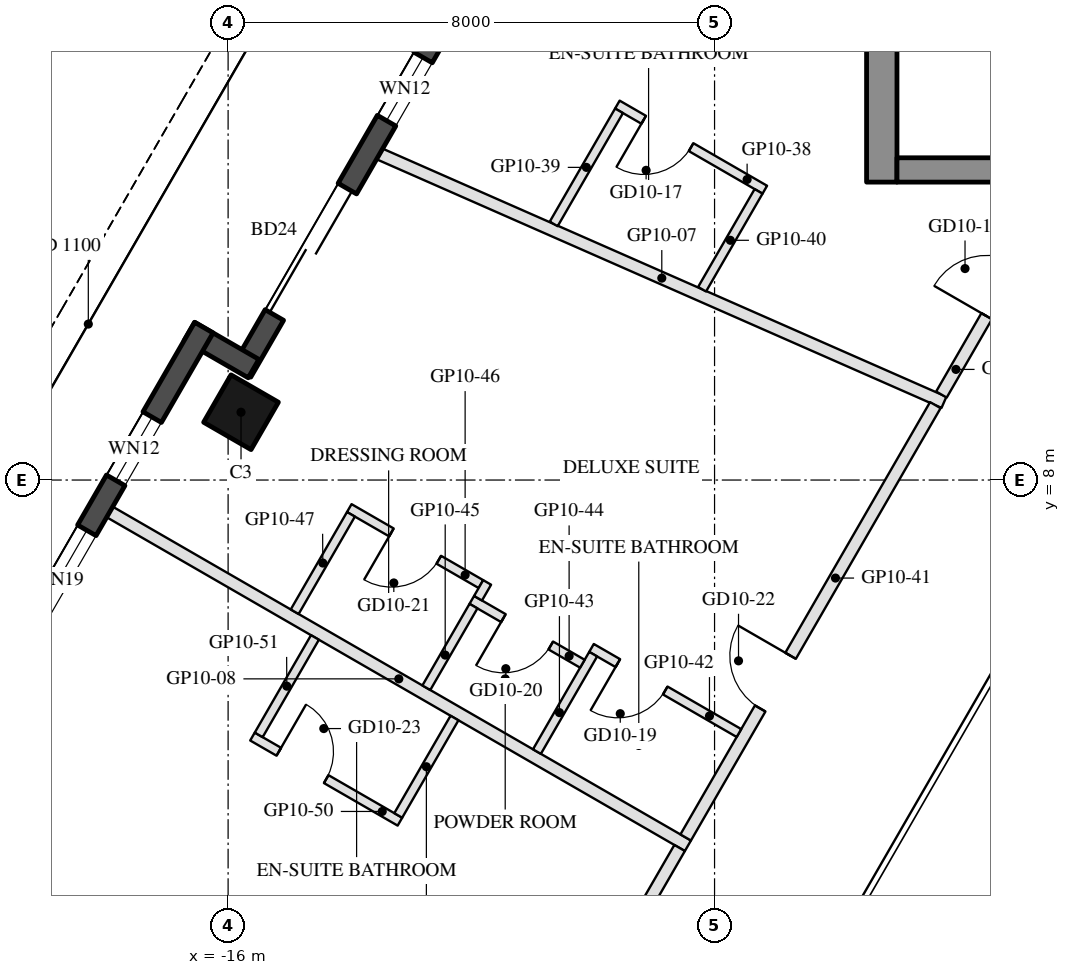
"""IFC4 building model, lengths in metres.
Left out: names, types, materials, properties, quantities, classifications, styles, units other than length and angle.
Written with IfcOpenShell. Run it as: python <this file> out.ifc"""

import sys

from ifc_helpers import new_model, si_unit, direction, frame, frame_2d, origin, origin_2d, place, context, subcontext, project, spatial, rectangle, hollow_rectangle, extrude, element, fill, save


model = new_model("IFC4")
c1 = context("Model", 3, precision=1e-05, world=origin(), true_north=direction((0.0, 1.0)))
c2 = subcontext(c1, "Body", "Model", "MODEL_VIEW")
j1 = project(units=[si_unit("LENGTHUNIT", "METRE"), si_unit("PLANEANGLEUNIT", "RADIAN")], contexts=[c1])
p1 = place(None, origin())
s1 = spatial("IfcSite", under=j1, at=p1, CompositionType="ELEMENT")
p2 = place(p1, origin())
s2 = spatial("IfcBuilding", under=s1, at=p2, CompositionType="ELEMENT")
p3 = place(p2, frame((0.0, 0.0, 116.8)))
s3 = spatial("IfcBuildingStorey", under=s2, at=p3, CompositionType="ELEMENT", Elevation=116.8)
p4 = place(p3, frame((-15.788, 9.115, 0.0), z_axis=(0.0, 0.0, 1.0), x_axis=(0.5, 0.866025403784, 0.0)))
e1 = element("IfcColumn", 1, at=p4, inside=s3, PredefinedType="COLUMN", context=c2, shape_type="SweptSolid", body=[
    extrude(hollow_rectangle(XDim=0.9, YDim=0.9, WallThickness=0.04, at=origin_2d()), origin(), (0.0, 0.0, 1.0), 3.7),
])
p5 = place(p3, frame((-12.409, 15.617, 0.0), z_axis=(0.0, 0.0, 1.0), x_axis=(-0.500003597184, -0.866023326939, 0.0)))
e2 = element("IfcWall", 2, at=p5, inside=s3, PredefinedType="SOLIDWALL", context=c2, shape_type="SweptSolid", body=[
    extrude(rectangle(XDim=6.74, YDim=0.35, at=frame_2d((3.37, 0.0))), origin(), (0.0, 0.0, 1.0), 3.55),
])
p6 = place(p5, frame((0.77, 0.0, 0.3)))
e3 = element("IfcOpeningElement", 3, at=p6, cuts=e2, PredefinedType="OPENING", context=c2, shape_type="SweptSolid", body=[
    extrude(rectangle(XDim=1.2, YDim=2.65, at=frame_2d((0.6, 1.325))), frame((0.0, 0.185, 0.0), z_axis=(0.0, -1.0, 0.0), x_axis=(1.0, 0.0, 0.0)), (0.0, 0.0, 1.0), 0.37),
])
p7 = place(p5, frame((3.26, 0.0, 0.0)))
e4 = element("IfcOpeningElement", 4, at=p7, cuts=e2, PredefinedType="OPENING", context=c2, shape_type="SweptSolid", body=[
    extrude(rectangle(XDim=2.4, YDim=2.4, at=frame_2d((1.2, 1.2))), frame((0.0, 0.185, 0.0), z_axis=(0.0, -1.0, 0.0), x_axis=(1.0, 0.0, 0.0)), (0.0, 0.0, 1.0), 0.37),
])
p8 = place(p3, frame((-15.581, 9.833, 0.0), z_axis=(0.0, 0.0, 1.0), x_axis=(-0.866055662726, 0.499947586314, 0.0)))
e5 = element("IfcWall", 5, at=p8, inside=s3, PredefinedType="SOLIDWALL", context=c2, shape_type="SweptSolid", body=[
    extrude(rectangle(XDim=1.22, YDim=0.35, at=frame_2d((0.61, 0.0))), origin(), (0.0, 0.0, 1.0), 3.55),
])
p9 = place(p3, frame((-16.398, 10.507, 0.0), z_axis=(0.0, 0.0, 1.0), x_axis=(-0.499999142773, -0.866025898704, 0.0)))
e6 = element("IfcWall", 6, at=p9, inside=s3, PredefinedType="SOLIDWALL", context=c2, shape_type="SweptSolid", body=[
    extrude(rectangle(XDim=9.7, YDim=0.35, at=frame_2d((4.85, 0.0))), origin(), (0.0, 0.0, 1.0), 3.55),
])
p10 = place(p9, frame((1.7, 0.0, 0.3)))
e7 = element("IfcOpeningElement", 7, at=p10, cuts=e6, PredefinedType="OPENING", context=c2, shape_type="SweptSolid", body=[
    extrude(rectangle(XDim=1.2, YDim=2.65, at=frame_2d((0.6, 1.325))), frame((0.0, 0.185, 0.0), z_axis=(0.0, -1.0, 0.0), x_axis=(1.0, 0.0, 0.0)), (0.0, 0.0, 1.0), 0.37),
])
p11 = place(p9, frame((3.85, 0.0, 0.3)))
e8 = element("IfcOpeningElement", 8, at=p11, cuts=e6, PredefinedType="OPENING", context=c2, shape_type="SweptSolid", body=[
    extrude(rectangle(XDim=1.9, YDim=2.65, at=frame_2d((0.95, 1.325))), frame((0.0, 0.185, 0.0), z_axis=(0.0, -1.0, 0.0), x_axis=(1.0, 0.0, 0.0)), (0.0, 0.0, 1.0), 0.37),
])
p12 = place(p9, frame((6.05, 0.0, 0.3)))
e9 = element("IfcOpeningElement", 9, at=p12, cuts=e6, PredefinedType="OPENING", context=c2, shape_type="SweptSolid", body=[
    extrude(rectangle(XDim=1.9, YDim=2.65, at=frame_2d((0.95, 1.325))), frame((0.0, 0.185, 0.0), z_axis=(0.0, -1.0, 0.0), x_axis=(1.0, 0.0, 0.0)), (0.0, 0.0, 1.0), 0.37),
])
p13 = place(p3, frame((-5.25, 12.9, 0.0), z_axis=(0.0, 0.0, 1.0), x_axis=(0.0, 1.0, 0.0)))
e10 = element("IfcWall", 10, at=p13, inside=s3, PredefinedType="SHEAR", context=c2, shape_type="SweptSolid", body=[
    extrude(rectangle(XDim=14.837, YDim=0.5, at=frame_2d((7.418, 0.0))), origin(), (0.0, 0.0, 1.0), 3.5),
])
p14 = place(p3, frame((5.0, 13.1, 0.0), z_axis=(0.0, 0.0, 1.0), x_axis=(-1.0, 0.0, 0.0)))
e11 = element("IfcWall", 11, at=p14, inside=s3, PredefinedType="SHEAR", context=c2, shape_type="SweptSolid", body=[
    extrude(rectangle(XDim=10.0, YDim=0.4, at=frame_2d((5.0, 0.0))), origin(), (0.0, 0.0, 1.0), 3.5),
])
p15 = place(p14, frame((3.55, 0.0, 0.0)))
e12 = element("IfcOpeningElement", 12, at=p15, cuts=e11, PredefinedType="OPENING", context=c2, shape_type="SweptSolid", body=[
    extrude(rectangle(XDim=1.1, YDim=2.1, at=frame_2d((0.55, 1.05))), frame((0.0, 0.21, 0.0), z_axis=(0.0, -1.0, 0.0), x_axis=(1.0, 0.0, 0.0)), (0.0, 0.0, 1.0), 0.42),
])
p16 = place(p14, frame((5.85, 0.0, 0.0)))
e13 = element("IfcOpeningElement", 13, at=p16, cuts=e11, PredefinedType="OPENING", context=c2, shape_type="SweptSolid", body=[
    extrude(rectangle(XDim=1.4, YDim=2.1, at=frame_2d((0.7, 1.05))), frame((0.0, 0.21, 0.0), z_axis=(0.0, -1.0, 0.0), x_axis=(1.0, 0.0, 0.0)), (0.0, 0.0, 1.0), 0.42),
])
p17 = place(p3, frame((-13.508, 13.363, 0.0), z_axis=(0.0, 0.0, 1.0), x_axis=(0.915297635711, -0.402778149932, 0.0)))
e14 = element("IfcWall", 14, at=p17, inside=s3, PredefinedType="PARTITIONING", context=c2, shape_type="SweptSolid", body=[
    extrude(rectangle(XDim=10.14, YDim=0.2, at=frame_2d((5.07, 0.0))), origin(), (0.0, 0.0, 1.0), 2.96),
])
p18 = place(p3, frame((-17.947, 7.475, 0.0), z_axis=(0.0, 0.0, 1.0), x_axis=(0.866027479907, -0.499996404033, 0.0)))
e15 = element("IfcWall", 15, at=p18, inside=s3, PredefinedType="PARTITIONING", context=c2, shape_type="SweptSolid", body=[
    extrude(rectangle(XDim=10.98, YDim=0.2, at=frame_2d((5.49, 0.0))), origin(), (0.0, 0.0, 1.0), 2.96),
])
p19 = place(p3, frame((-4.269, 9.406, 0.0), z_axis=(0.0, 0.0, 1.0), x_axis=(0.499968678846, 0.866043486306, 0.0)))
e16 = element("IfcWall", 16, at=p19, inside=s3, PredefinedType="PARTITIONING", context=c2, shape_type="SweptSolid", body=[
    extrude(rectangle(XDim=3.977, YDim=0.2, at=frame_2d((1.988, 0.0))), origin(), (0.0, 0.0, 1.0), 2.95),
])
p20 = place(p19, frame((1.488, 0.0, 0.0)))
e17 = element("IfcOpeningElement", 17, at=p20, cuts=e16, PredefinedType="OPENING", context=c2, shape_type="SweptSolid", body=[
    extrude(rectangle(XDim=1.0, YDim=2.1, at=frame_2d((0.5, 1.05))), frame((0.0, 0.11, 0.0), z_axis=(0.0, -1.0, 0.0), x_axis=(1.0, 0.0, 0.0)), (0.0, 0.0, 1.0), 0.22),
])
p21 = place(p3, frame((-7.174, 12.775, 0.0), z_axis=(0.0, 0.0, 1.0), x_axis=(-0.866034573852, 0.49998411664, 0.0)))
e18 = element("IfcWall", 18, at=p21, inside=s3, PredefinedType="PARTITIONING", context=c2, shape_type="SweptSolid", body=[
    extrude(rectangle(XDim=2.8, YDim=0.15, at=frame_2d((1.4, 0.0))), origin(), (0.0, 0.0, 1.0), 3.55),
])
p22 = place(p21, frame((1.4, 0.0, 0.0)))
e19 = element("IfcOpeningElement", 19, at=p22, cuts=e18, PredefinedType="OPENING", context=c2, shape_type="SweptSolid", body=[
    extrude(rectangle(XDim=0.9, YDim=2.1, at=frame_2d((0.45, 1.05))), frame((0.0, 0.085, 0.0), z_axis=(0.0, -1.0, 0.0), x_axis=(1.0, 0.0, 0.0)), (0.0, 0.0, 1.0), 0.17),
])
p23 = place(p3, frame((-9.571, 14.073, 0.0), z_axis=(0.0, 0.0, 1.0), x_axis=(-0.50005036918, -0.865996321171, 0.0)))
e20 = element("IfcWall", 20, at=p23, inside=s3, PredefinedType="PARTITIONING", context=c2, shape_type="SweptSolid", body=[
    extrude(rectangle(XDim=2.148, YDim=0.15, at=frame_2d((1.074, 0.0))), origin(), (0.0, 0.0, 1.0), 3.55),
])
p24 = place(p3, frame((-7.276, 12.748, 0.0), z_axis=(0.0, 0.0, 1.0), x_axis=(-0.500067438192, -0.865986464825, 0.0)))
e21 = element("IfcWall", 21, at=p24, inside=s3, PredefinedType="PARTITIONING", context=c2, shape_type="SweptSolid", body=[
    extrude(rectangle(XDim=1.858, YDim=0.15, at=frame_2d((0.929, 0.0))), origin(), (0.0, 0.0, 1.0), 3.55),
])
p25 = place(p3, frame((-8.475, 2.122, 0.0), z_axis=(0.0, 0.0, 1.0), x_axis=(0.500005592383, 0.866022174996, 0.0)))
e22 = element("IfcWall", 22, at=p25, inside=s3, PredefinedType="PARTITIONING", context=c2, shape_type="SweptSolid", body=[
    extrude(rectangle(XDim=8.21, YDim=0.2, at=frame_2d((4.105, 0.0))), origin(), (0.0, 0.0, 1.0), 2.95),
])
p26 = place(p25, frame((2.45, 0.0, 0.0)))
e23 = element("IfcOpeningElement", 23, at=p26, cuts=e22, PredefinedType="OPENING", context=c2, shape_type="SweptSolid", body=[
    extrude(rectangle(XDim=1.0, YDim=2.1, at=frame_2d((0.5, 1.05))), frame((0.0, 0.11, 0.0), z_axis=(0.0, -1.0, 0.0), x_axis=(1.0, 0.0, 0.0)), (0.0, 0.0, 1.0), 0.22),
])
p27 = place(p3, frame((-7.599, 3.839, 0.0), z_axis=(0.0, 0.0, 1.0), x_axis=(-0.866056369097, 0.49994636267, 0.0)))
e24 = element("IfcWall", 24, at=p27, inside=s3, PredefinedType="PARTITIONING", context=c2, shape_type="SweptSolid", body=[
    extrude(rectangle(XDim=2.8, YDim=0.15, at=frame_2d((1.4, 0.0))), origin(), (0.0, 0.0, 1.0), 3.55),
])
p28 = place(p27, frame((1.4, 0.0, 0.0)))
e25 = element("IfcOpeningElement", 25, at=p28, cuts=e24, PredefinedType="OPENING", context=c2, shape_type="SweptSolid", body=[
    extrude(rectangle(XDim=0.9, YDim=2.1, at=frame_2d((0.45, 1.05))), frame((0.0, 0.085, 0.0), z_axis=(0.0, -1.0, 0.0), x_axis=(1.0, 0.0, 0.0)), (0.0, 0.0, 1.0), 0.17),
])
p29 = place(p3, frame((-9.996, 5.136, 0.0), z_axis=(0.0, 0.0, 1.0), x_axis=(-0.499985172903, -0.866033964044, 0.0)))
e26 = element("IfcWall", 26, at=p29, inside=s3, PredefinedType="PARTITIONING", context=c2, shape_type="SweptSolid", body=[
    extrude(rectangle(XDim=1.85, YDim=0.15, at=frame_2d((0.925, 0.0))), origin(), (0.0, 0.0, 1.0), 3.55),
])
p30 = place(p3, frame((-10.174, 4.979, 0.0), z_axis=(0.0, 0.0, 1.0), x_axis=(-0.866009402589, 0.500027713859, 0.0)))
e27 = element("IfcWall", 27, at=p30, inside=s3, PredefinedType="PARTITIONING", context=c2, shape_type="SweptSolid", body=[
    extrude(rectangle(XDim=2.1, YDim=0.15, at=frame_2d((1.05, 0.0))), origin(), (0.0, 0.0, 1.0), 3.55),
])
p31 = place(p30, frame((0.6, 0.0, 0.0)))
e28 = element("IfcOpeningElement", 28, at=p31, cuts=e27, PredefinedType="OPENING", context=c2, shape_type="SweptSolid", body=[
    extrude(rectangle(XDim=0.9, YDim=2.1, at=frame_2d((0.45, 1.05))), frame((0.0, 0.085, 0.0), z_axis=(0.0, -1.0, 0.0), x_axis=(1.0, 0.0, 0.0)), (0.0, 0.0, 1.0), 0.17),
])
p32 = place(p3, frame((-11.965, 5.927, 0.0), z_axis=(0.0, 0.0, 1.0), x_axis=(-0.499899694197, -0.866083307622, 0.0)))
e29 = element("IfcWall", 29, at=p32, inside=s3, PredefinedType="PARTITIONING", context=c2, shape_type="SweptSolid", body=[
    extrude(rectangle(XDim=1.55, YDim=0.15, at=frame_2d((0.775, 0.0))), origin(), (0.0, 0.0, 1.0), 3.55),
])
p33 = place(p3, frame((-11.842, 6.289, 0.0), z_axis=(0.0, 0.0, 1.0), x_axis=(-0.866022959057, 0.500004234368, 0.0)))
e30 = element("IfcWall", 30, at=p33, inside=s3, PredefinedType="PARTITIONING", context=c2, shape_type="SweptSolid", body=[
    extrude(rectangle(XDim=2.5, YDim=0.15, at=frame_2d((1.25, 0.0))), origin(), (0.0, 0.0, 1.0), 3.55),
])
p34 = place(p33, frame((0.8, 0.0, 0.0)))
e31 = element("IfcOpeningElement", 31, at=p34, cuts=e30, PredefinedType="OPENING", context=c2, shape_type="SweptSolid", body=[
    extrude(rectangle(XDim=0.9, YDim=2.1, at=frame_2d((0.45, 1.05))), frame((0.0, 0.085, 0.0), z_axis=(0.0, -1.0, 0.0), x_axis=(1.0, 0.0, 0.0)), (0.0, 0.0, 1.0), 0.17),
])
p35 = place(p3, frame((-13.98, 7.436, 0.0), z_axis=(0.0, 0.0, 1.0), x_axis=(-0.499886193382, -0.866091100096, 0.0)))
e32 = element("IfcWall", 32, at=p35, inside=s3, PredefinedType="PARTITIONING", context=c2, shape_type="SweptSolid", body=[
    extrude(rectangle(XDim=1.85, YDim=0.15, at=frame_2d((0.925, 0.0))), origin(), (0.0, 0.0, 1.0), 3.55),
])
p36 = place(p3, frame((-11.74, 6.316, 0.0), z_axis=(0.0, 0.0, 1.0), x_axis=(-0.500426713919, -0.865778900179, 0.0)))
e33 = element("IfcWall", 33, at=p36, inside=s3, PredefinedType="PARTITIONING", context=c2, shape_type="SweptSolid", body=[
    extrude(rectangle(XDim=0.3, YDim=0.15, at=frame_2d((0.15, 0.0))), origin(), (0.0, 0.0, 1.0), 3.55),
])
p37 = place(p3, frame((-12.269, -4.45, 0.0), z_axis=(0.0, 0.0, 1.0), x_axis=(0.500009454961, 0.866019944892, 0.0)))
e34 = element("IfcWall", 34, at=p37, inside=s3, PredefinedType="PARTITIONING", context=c2, shape_type="SweptSolid", body=[
    extrude(rectangle(XDim=7.388, YDim=0.2, at=frame_2d((3.694, 0.0))), origin(), (0.0, 0.0, 1.0), 2.95),
])
p38 = place(p37, frame((3.194, 0.0, 0.0)))
e35 = element("IfcOpeningElement", 35, at=p38, cuts=e34, PredefinedType="OPENING", context=c2, shape_type="SweptSolid", body=[
    extrude(rectangle(XDim=1.0, YDim=2.1, at=frame_2d((0.5, 1.05))), frame((0.0, 0.11, 0.0), z_axis=(0.0, -1.0, 0.0), x_axis=(1.0, 0.0, 0.0)), (0.0, 0.0, 1.0), 0.22),
])
p39 = place(p3, frame((-15.599, 3.781, 0.0), z_axis=(0.0, 0.0, 1.0), x_axis=(0.866018616679, -0.500011755427, 0.0)))
e36 = element("IfcWall", 36, at=p39, inside=s3, PredefinedType="PARTITIONING", context=c2, shape_type="SweptSolid", body=[
    extrude(rectangle(XDim=2.8, YDim=0.15, at=frame_2d((1.4, 0.0))), origin(), (0.0, 0.0, 1.0), 3.55),
])
p40 = place(p39, frame((0.5, 0.0, 0.0)))
e37 = element("IfcOpeningElement", 37, at=p40, cuts=e36, PredefinedType="OPENING", context=c2, shape_type="SweptSolid", body=[
    extrude(rectangle(XDim=0.9, YDim=2.1, at=frame_2d((0.45, 1.05))), frame((0.0, 0.085, 0.0), z_axis=(0.0, -1.0, 0.0), x_axis=(1.0, 0.0, 0.0)), (0.0, 0.0, 1.0), 0.17),
])
p41 = place(p3, frame((-14.572, 5.411, 0.0), z_axis=(0.0, 0.0, 1.0), x_axis=(-0.499985172903, -0.866033964044, 0.0)))
e38 = element("IfcWall", 38, at=p41, inside=s3, PredefinedType="PARTITIONING", context=c2, shape_type="SweptSolid", body=[
    extrude(rectangle(XDim=1.85, YDim=0.15, at=frame_2d((0.925, 0.0))), origin(), (0.0, 0.0, 1.0), 2.95),
])
p42 = place(p3, frame((-12.277, 4.086, 0.0), z_axis=(0.0, 0.0, 1.0), x_axis=(-0.500042316284, -0.866000971088, 0.0)))
e39 = element("IfcWall", 39, at=p42, inside=s3, PredefinedType="PARTITIONING", context=c2, shape_type="SweptSolid", body=[
    extrude(rectangle(XDim=1.85, YDim=0.15, at=frame_2d((0.925, 0.0))), origin(), (0.0, 0.0, 1.0), 2.95),
])
p43 = place(p6, origin())
e40 = element("IfcWindow", 40, at=p43, inside=s3, PartitioningType="SINGLE_PANEL", PredefinedType="WINDOW", context=c2, shape_type="SweptSolid", body=[
    extrude(rectangle(XDim=1.2, YDim=2.65, at=frame_2d((0.6, 1.325))), frame((0.0, 0.03, 0.0), z_axis=(0.0, -1.0, 0.0), x_axis=(1.0, 0.0, 0.0)), (0.0, 0.0, 1.0), 0.06),
])
fill(e3, e40)
p44 = place(p7, frame((2.4, 0.0, 0.0), z_axis=(0.0, 0.0, 1.0), x_axis=(-1.0, 0.0, 0.0)))
e41 = element("IfcDoor", 41, at=p44, inside=s3, OperationType="SLIDING_TO_LEFT", PredefinedType="DOOR", context=c2, shape_type="SweptSolid", body=[
    extrude(rectangle(XDim=2.4, YDim=2.4, at=frame_2d((1.2, 1.2))), frame((0.0, 0.025, 0.0), z_axis=(0.0, -1.0, 0.0), x_axis=(1.0, 0.0, 0.0)), (0.0, 0.0, 1.0), 0.05),
])
fill(e4, e41)
p45 = place(p10, origin())
e42 = element("IfcWindow", 42, at=p45, inside=s3, PartitioningType="SINGLE_PANEL", PredefinedType="WINDOW", context=c2, shape_type="SweptSolid", body=[
    extrude(rectangle(XDim=1.2, YDim=2.65, at=frame_2d((0.6, 1.325))), frame((0.0, 0.03, 0.0), z_axis=(0.0, -1.0, 0.0), x_axis=(1.0, 0.0, 0.0)), (0.0, 0.0, 1.0), 0.06),
])
fill(e7, e42)
p46 = place(p11, origin())
e43 = element("IfcWindow", 43, at=p46, inside=s3, PartitioningType="SINGLE_PANEL", PredefinedType="WINDOW", context=c2, shape_type="SweptSolid", body=[
    extrude(rectangle(XDim=1.9, YDim=2.65, at=frame_2d((0.95, 1.325))), frame((0.0, 0.03, 0.0), z_axis=(0.0, -1.0, 0.0), x_axis=(1.0, 0.0, 0.0)), (0.0, 0.0, 1.0), 0.06),
])
fill(e8, e43)
p47 = place(p22, origin())
e44 = element("IfcDoor", 44, at=p47, inside=s3, OperationType="SINGLE_SWING_RIGHT", PredefinedType="DOOR", context=c2, shape_type="SweptSolid", body=[
    extrude(rectangle(XDim=0.9, YDim=2.1, at=frame_2d((0.45, 1.05))), frame((0.0, 0.025, 0.0), z_axis=(0.0, -1.0, 0.0), x_axis=(1.0, 0.0, 0.0)), (0.0, 0.0, 1.0), 0.05),
])
fill(e19, e44)
p48 = place(p20, origin())
e45 = element("IfcDoor", 45, at=p48, inside=s3, OperationType="SINGLE_SWING_LEFT", PredefinedType="DOOR", context=c2, shape_type="SweptSolid", body=[
    extrude(rectangle(XDim=1.0, YDim=2.1, at=frame_2d((0.5, 1.05))), frame((0.0, 0.025, 0.0), z_axis=(0.0, -1.0, 0.0), x_axis=(1.0, 0.0, 0.0)), (0.0, 0.0, 1.0), 0.05),
])
fill(e17, e45)
p49 = place(p28, origin())
e46 = element("IfcDoor", 46, at=p49, inside=s3, OperationType="SINGLE_SWING_RIGHT", PredefinedType="DOOR", context=c2, shape_type="SweptSolid", body=[
    extrude(rectangle(XDim=0.9, YDim=2.1, at=frame_2d((0.45, 1.05))), frame((0.0, 0.025, 0.0), z_axis=(0.0, -1.0, 0.0), x_axis=(1.0, 0.0, 0.0)), (0.0, 0.0, 1.0), 0.05),
])
fill(e25, e46)
p50 = place(p31, origin())
e47 = element("IfcDoor", 47, at=p50, inside=s3, OperationType="SINGLE_SWING_RIGHT", PredefinedType="DOOR", context=c2, shape_type="SweptSolid", body=[
    extrude(rectangle(XDim=0.9, YDim=2.1, at=frame_2d((0.45, 1.05))), frame((0.0, 0.025, 0.0), z_axis=(0.0, -1.0, 0.0), x_axis=(1.0, 0.0, 0.0)), (0.0, 0.0, 1.0), 0.05),
])
fill(e28, e47)
p51 = place(p34, origin())
e48 = element("IfcDoor", 48, at=p51, inside=s3, OperationType="SINGLE_SWING_RIGHT", PredefinedType="DOOR", context=c2, shape_type="SweptSolid", body=[
    extrude(rectangle(XDim=0.9, YDim=2.1, at=frame_2d((0.45, 1.05))), frame((0.0, 0.025, 0.0), z_axis=(0.0, -1.0, 0.0), x_axis=(1.0, 0.0, 0.0)), (0.0, 0.0, 1.0), 0.05),
])
fill(e31, e48)
p52 = place(p26, origin())
e49 = element("IfcDoor", 49, at=p52, inside=s3, OperationType="SINGLE_SWING_RIGHT", PredefinedType="DOOR", context=c2, shape_type="SweptSolid", body=[
    extrude(rectangle(XDim=1.0, YDim=2.1, at=frame_2d((0.5, 1.05))), frame((0.0, 0.025, 0.0), z_axis=(0.0, -1.0, 0.0), x_axis=(1.0, 0.0, 0.0)), (0.0, 0.0, 1.0), 0.05),
])
fill(e23, e49)
p53 = place(p40, origin())
e50 = element("IfcDoor", 50, at=p53, inside=s3, OperationType="SINGLE_SWING_LEFT", PredefinedType="DOOR", context=c2, shape_type="SweptSolid", body=[
    extrude(rectangle(XDim=0.9, YDim=2.1, at=frame_2d((0.45, 1.05))), frame((0.0, 0.025, 0.0), z_axis=(0.0, -1.0, 0.0), x_axis=(1.0, 0.0, 0.0)), (0.0, 0.0, 1.0), 0.05),
])
fill(e37, e50)
save(model, sys.argv[1])
